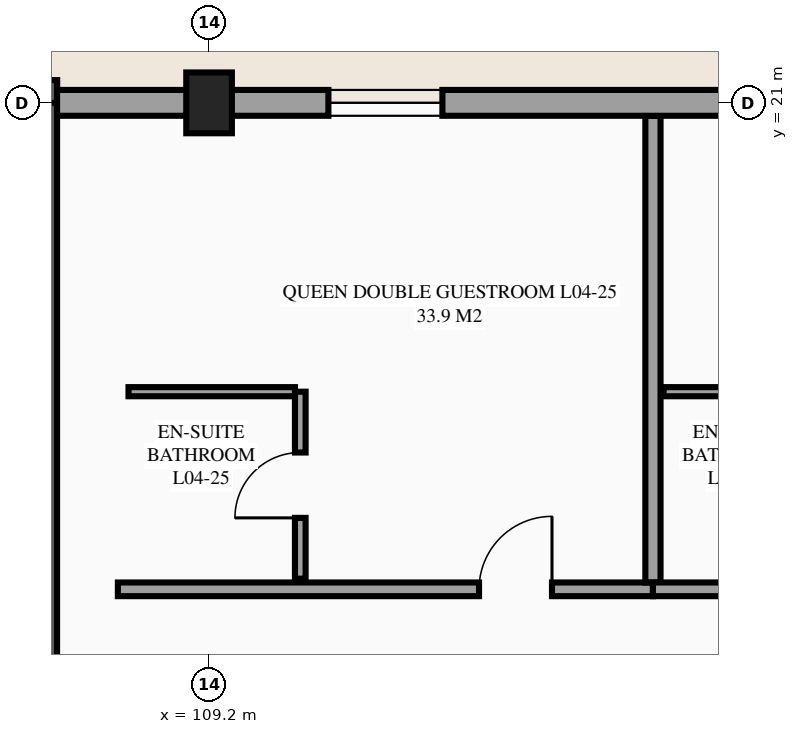
"""IFC4 building model, lengths in metres.
Left out: names, types, materials, properties, quantities, classifications, styles, units other than length and angle.
Written with IfcOpenShell. Run it as: python <this file> out.ifc"""

import sys

from ifc_helpers import new_model, si_unit, direction, frame, frame_2d, origin, origin_2d, place, context, subcontext, project, spatial, rectangle, extrude, element, fill, save


model = new_model("IFC4")
c1 = context("Model", 3, precision=1e-05, world=origin(), true_north=direction((0.0, 1.0)))
c2 = subcontext(c1, "Body", "Model", "MODEL_VIEW")
j1 = project(units=[si_unit("LENGTHUNIT", "METRE"), si_unit("PLANEANGLEUNIT", "RADIAN")], contexts=[c1])
p1 = place(None, origin())
s1 = spatial("IfcSite", under=j1, at=p1, CompositionType="ELEMENT")
p2 = place(p1, origin())
s2 = spatial("IfcBuilding", under=s1, at=p2, CompositionType="ELEMENT")
p3 = place(p2, frame((0.0, 0.0, 18.3)))
s3 = spatial("IfcBuildingStorey", under=s2, at=p3, CompositionType="ELEMENT", Elevation=18.3)
p4 = place(p3, frame((109.2, 21.0, 0.0), z_axis=(0.0, 0.0, 1.0), x_axis=(1.0, 0.0, 0.0)))
e1 = element("IfcColumn", 1, at=p4, inside=s3, PredefinedType="COLUMN", context=c2, shape_type="SweptSolid", body=[
    extrude(rectangle(XDim=0.6, YDim=0.8, at=origin_2d()), origin(), (0.0, 0.0, 1.0), 3.6),
])
p5 = place(p3, frame((107.05, 12.46, 0.0), z_axis=(0.0, 0.0, 1.0), x_axis=(0.0, 1.0, 0.0)))
e2 = element("IfcWall", 2, at=p5, inside=s3, PredefinedType="SHEAR", context=c2, shape_type="SweptSolid", body=[
    extrude(rectangle(XDim=8.84, YDim=0.3, at=frame_2d((4.42, 0.0))), origin(), (0.0, 0.0, 1.0), 3.6),
])
p6 = place(p3, frame((107.2, 21.15, 0.0), z_axis=(0.0, 0.0, 1.0), x_axis=(-1.0, 0.0, 0.0)))
e3 = element("IfcWall", 3, at=p6, inside=s3, PredefinedType="SHEAR", context=c2, shape_type="SweptSolid", body=[
    extrude(rectangle(XDim=5.2, YDim=0.3, at=frame_2d((2.6, 0.0))), origin(), (0.0, 0.0, 1.0), 3.6),
])
p7 = place(p3, frame((108.0, 14.6, 0.0), z_axis=(0.0, 0.0, 1.0), x_axis=(1.0, 0.0, 0.0)))
e4 = element("IfcWall", 4, at=p7, inside=s3, PredefinedType="PARTITIONING", context=c2, shape_type="SweptSolid", body=[
    extrude(rectangle(XDim=7.04, YDim=0.18, at=frame_2d((3.52, 0.0))), origin(), (0.0, 0.0, 1.0), 3.375),
])
p8 = place(p7, frame((4.752, 0.0, 0.0)))
e5 = element("IfcOpeningElement", 5, at=p8, cuts=e4, PredefinedType="OPENING", context=c2, shape_type="SweptSolid", body=[
    extrude(rectangle(XDim=0.96, YDim=2.15, at=frame_2d((0.48, 1.075))), frame((0.0, 0.1, 0.0), z_axis=(0.0, -1.0, 0.0), x_axis=(1.0, 0.0, 0.0)), (0.0, 0.0, 1.0), 0.2),
])
p9 = place(p3, frame((115.04, 14.69, 0.0), z_axis=(0.0, 0.0, 1.0), x_axis=(0.0, 1.0, 0.0)))
e6 = element("IfcWall", 6, at=p9, inside=s3, PredefinedType="PARTITIONING", context=c2, shape_type="SweptSolid", body=[
    extrude(rectangle(XDim=6.14, YDim=0.2, at=frame_2d((3.07, 0.0))), origin(), (0.0, 0.0, 1.0), 3.375),
])
p10 = place(p3, frame((110.4, 14.74, 0.0), z_axis=(0.0, 0.0, 1.0), x_axis=(0.0, 1.0, 0.0)))
e7 = element("IfcWall", 7, at=p10, inside=s3, PredefinedType="PARTITIONING", context=c2, shape_type="SweptSolid", body=[
    extrude(rectangle(XDim=2.46, YDim=0.14, at=frame_2d((1.23, 0.0))), origin(), (0.0, 0.0, 1.0), 3.375),
])
p11 = place(p10, frame((0.8, 0.0, 0.0)))
e8 = element("IfcOpeningElement", 8, at=p11, cuts=e7, PredefinedType="OPENING", context=c2, shape_type="SweptSolid", body=[
    extrude(rectangle(XDim=0.86, YDim=2.1, at=frame_2d((0.43, 1.05))), frame((0.0, 0.08, 0.0), z_axis=(0.0, -1.0, 0.0), x_axis=(1.0, 0.0, 0.0)), (0.0, 0.0, 1.0), 0.16),
])
p12 = place(p3, frame((108.14, 17.2, 0.0), z_axis=(0.0, 0.0, 1.0), x_axis=(1.0, 0.0, 0.0)))
e9 = element("IfcWall", 9, at=p12, inside=s3, PredefinedType="PARTITIONING", context=c2, shape_type="SweptSolid", body=[
    extrude(rectangle(XDim=2.19, YDim=0.12, at=frame_2d((1.095, 0.0))), origin(), (0.0, 0.0, 1.0), 3.375),
])
p13 = place(p3, frame((115.04, 14.6, 0.0), z_axis=(0.0, 0.0, 1.0), x_axis=(1.0, 0.0, 0.0)))
e10 = element("IfcWall", 10, at=p13, inside=s3, PredefinedType="PARTITIONING", context=c2, shape_type="SweptSolid", body=[
    extrude(rectangle(XDim=7.04, YDim=0.18, at=frame_2d((3.52, 0.0))), origin(), (0.0, 0.0, 1.0), 3.375),
])
p14 = place(p13, frame((4.752, 0.0, 0.0)))
e11 = element("IfcOpeningElement", 11, at=p14, cuts=e10, PredefinedType="OPENING", context=c2, shape_type="SweptSolid", body=[
    extrude(rectangle(XDim=0.96, YDim=2.15, at=frame_2d((0.48, 1.075))), frame((0.0, 0.1, 0.0), z_axis=(0.0, -1.0, 0.0), x_axis=(1.0, 0.0, 0.0)), (0.0, 0.0, 1.0), 0.2),
])
p15 = place(p3, frame((115.18, 17.2, 0.0), z_axis=(0.0, 0.0, 1.0), x_axis=(1.0, 0.0, 0.0)))
e12 = element("IfcWall", 12, at=p15, inside=s3, PredefinedType="PARTITIONING", context=c2, shape_type="SweptSolid", body=[
    extrude(rectangle(XDim=2.19, YDim=0.12, at=frame_2d((1.095, 0.0))), origin(), (0.0, 0.0, 1.0), 3.375),
])
p16 = place(p3, frame((117.6, 21.0, 0.0), z_axis=(0.0, 0.0, 1.0), x_axis=(-1.0, 0.0, 0.0)))
e13 = element("IfcWall", 13, at=p16, inside=s3, PredefinedType="STANDARD", context=c2, shape_type="SweptSolid", body=[
    extrude(rectangle(XDim=8.4, YDim=0.34, at=frame_2d((4.2, 0.0))), origin(), (0.0, 0.0, 1.0), 2.53),
])
p17 = place(p16, frame((5.33, 0.0, 0.85)))
e14 = element("IfcOpeningElement", 14, at=p17, cuts=e13, PredefinedType="OPENING", context=c2, shape_type="SweptSolid", body=[
    extrude(rectangle(XDim=1.5, YDim=1.5, at=frame_2d((0.75, 0.75))), frame((0.0, 0.18, 0.0), z_axis=(0.0, -1.0, 0.0), x_axis=(1.0, 0.0, 0.0)), (0.0, 0.0, 1.0), 0.36),
])
p18 = place(p3, frame((109.2, 21.0, 0.0), z_axis=(0.0, 0.0, 1.0), x_axis=(-1.0, 0.0, 0.0)))
e15 = element("IfcWall", 15, at=p18, inside=s3, PredefinedType="STANDARD", context=c2, shape_type="SweptSolid", body=[
    extrude(rectangle(XDim=2.0, YDim=0.34, at=frame_2d((1.0, 0.0))), origin(), (0.0, 0.0, 1.0), 2.43),
])
p19 = place(p17, origin())
e16 = element("IfcWindow", 16, at=p19, inside=s3, PartitioningType="SINGLE_PANEL", PredefinedType="WINDOW", context=c2, shape_type="SweptSolid", body=[
    extrude(rectangle(XDim=1.5, YDim=1.5, at=frame_2d((0.75, 0.75))), frame((0.0, 0.03, 0.0), z_axis=(0.0, -1.0, 0.0), x_axis=(1.0, 0.0, 0.0)), (0.0, 0.0, 1.0), 0.06),
])
fill(e14, e16)
p20 = place(p8, origin())
e17 = element("IfcDoor", 17, at=p20, inside=s3, OperationType="SINGLE_SWING_RIGHT", PredefinedType="DOOR", context=c2, shape_type="SweptSolid", body=[
    extrude(rectangle(XDim=0.96, YDim=2.15, at=frame_2d((0.48, 1.075))), frame((0.0, 0.025, 0.0), z_axis=(0.0, -1.0, 0.0), x_axis=(1.0, 0.0, 0.0)), (0.0, 0.0, 1.0), 0.05),
])
fill(e5, e17)
p21 = place(p11, origin())
e18 = element("IfcDoor", 18, at=p21, inside=s3, OperationType="SINGLE_SWING_LEFT", PredefinedType="DOOR", context=c2, shape_type="SweptSolid", body=[
    extrude(rectangle(XDim=0.86, YDim=2.1, at=frame_2d((0.43, 1.05))), frame((0.0, 0.025, 0.0), z_axis=(0.0, -1.0, 0.0), x_axis=(1.0, 0.0, 0.0)), (0.0, 0.0, 1.0), 0.05),
])
fill(e8, e18)
save(model, sys.argv[1])
